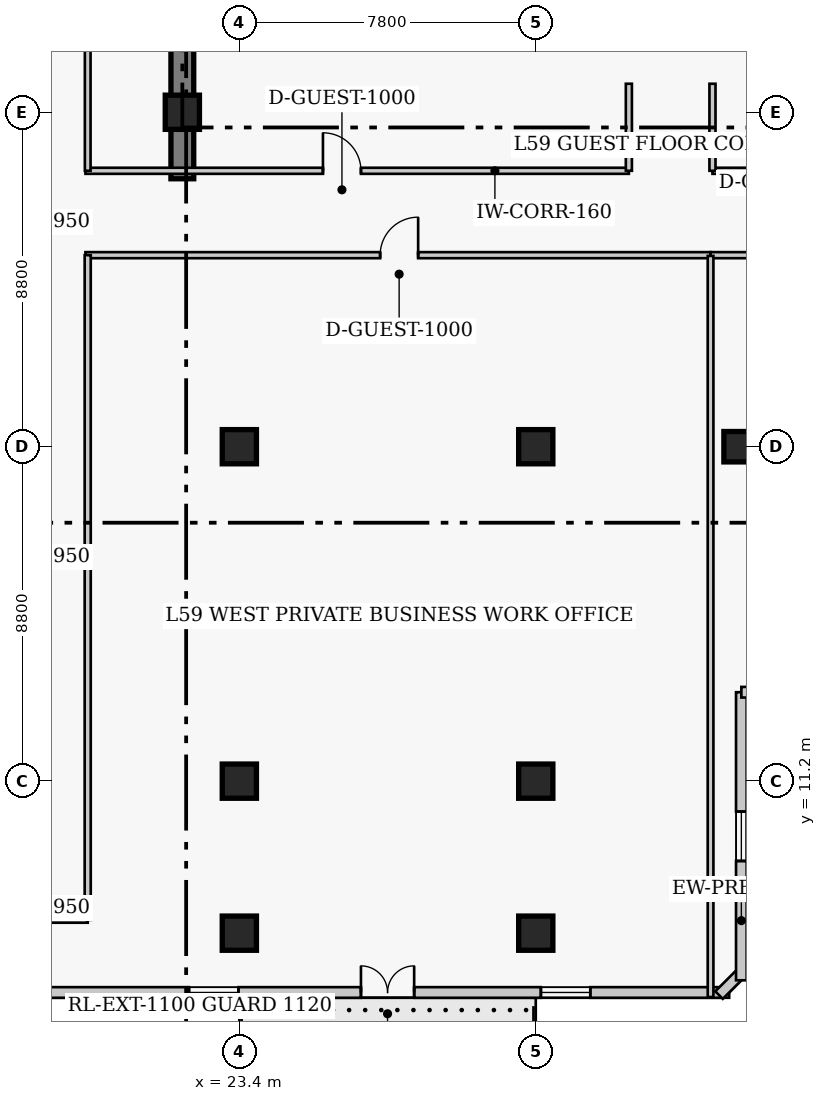
"""IFC4 building model, lengths in metres.
Left out: names, types, materials, properties, quantities, classifications, styles, units other than length and angle.
Written with IfcOpenShell. Run it as: python <this file> out.ifc"""

import sys

from ifc_helpers import new_model, si_unit, direction, frame, frame_2d, origin, origin_2d, place, context, subcontext, project, spatial, rectangle, extrude, element, fill, save


model = new_model("IFC4")
c1 = context("Model", 3, precision=1e-05, world=origin(), true_north=direction((0.0, 1.0)))
c2 = subcontext(c1, "Body", "Model", "MODEL_VIEW")
j1 = project(units=[si_unit("LENGTHUNIT", "METRE"), si_unit("PLANEANGLEUNIT", "RADIAN")], contexts=[c1])
p1 = place(None, origin())
s1 = spatial("IfcSite", under=j1, at=p1, CompositionType="ELEMENT")
p2 = place(p1, origin())
s2 = spatial("IfcBuilding", under=s1, at=p2, CompositionType="ELEMENT")
p3 = place(p2, frame((0.0, 0.0, 236.5)))
s3 = spatial("IfcBuildingStorey", under=s2, at=p3, CompositionType="ELEMENT", Elevation=236.5)
p4 = place(p3, frame((21.9, 27.05, 0.0), z_axis=(0.0, 0.0, 1.0), x_axis=(0.0, 1.0, 0.0)))
e1 = element("IfcWall", 1, at=p4, inside=s3, PredefinedType="SHEAR", context=c2, shape_type="SweptSolid", body=[
    extrude(rectangle(XDim=13.57, YDim=0.6, at=frame_2d((6.785, 0.0))), origin(), (0.0, 0.0, 1.0), 3.9),
])
for number, where, z_axis, x_axis in (
    (2, (23.4, 11.2, 0.0), (0.0, 0.0, 1.0), (1.0, 0.0, 0.0)),
    (3, (23.4, 20.0, 0.0), (0.0, 0.0, 1.0), (1.0, 0.0, 0.0)),
    (4, (31.2, 11.2, 0.0), (0.0, 0.0, 1.0), (1.0, 0.0, 0.0)),
    (5, (31.2, 20.0, 0.0), (0.0, 0.0, 1.0), (1.0, 0.0, 0.0)),
):
    element("IfcColumn", number, at=place(p3, frame(where, z_axis=z_axis, x_axis=x_axis)), inside=s3, PredefinedType="COLUMN", context=c2, shape_type="SweptSolid", body=[
        extrude(rectangle(XDim=0.9, YDim=0.9, at=origin_2d()), origin(), (0.0, 0.0, 1.0), 3.9),
    ])
p5 = place(p3, frame((36.75, 20.0, 0.0), z_axis=(0.0, 0.0, 1.0), x_axis=(1.0, 0.0, 0.0)))
e6 = element("IfcColumn", 6, at=p5, inside=s3, PredefinedType="COLUMN", context=c2, shape_type="SweptSolid", body=[
    extrude(rectangle(XDim=1.2, YDim=0.8, at=origin_2d()), origin(), (0.0, 0.0, 1.0), 3.9),
])
for number, where, z_axis, x_axis in (
    (7, (21.9, 28.8, 0.0), (0.0, 0.0, 1.0), (1.0, 0.0, 0.0)),
    (8, (23.4, 7.2, 0.0), (0.0, 0.0, 1.0), (1.0, 0.0, 0.0)),
    (9, (31.2, 7.2, 0.0), (0.0, 0.0, 1.0), (1.0, 0.0, 0.0)),
):
    element("IfcColumn", number, at=place(p3, frame(where, z_axis=z_axis, x_axis=x_axis)), inside=s3, PredefinedType="COLUMN", context=c2, shape_type="SweptSolid", body=[
        extrude(rectangle(XDim=0.9, YDim=0.9, at=origin_2d()), origin(), (0.0, 0.0, 1.0), 3.9),
    ])
p6 = place(p3, frame((10.46, 5.64, 0.0), z_axis=(0.0, 0.0, 1.0), x_axis=(1.0, 0.0, 0.0)))
e10 = element("IfcWall", 10, at=p6, inside=s3, PredefinedType="SOLIDWALL", context=c2, shape_type="SweptSolid", body=[
    extrude(rectangle(XDim=25.83, YDim=0.28, at=frame_2d((12.915, 0.0))), origin(), (0.0, 0.0, 1.0), 3.52),
])
p7 = place(p6, frame((16.14, 0.0, 0.0)))
e11 = element("IfcOpeningElement", 11, at=p7, cuts=e10, PredefinedType="OPENING", context=c2, shape_type="SweptSolid", body=[
    extrude(rectangle(XDim=1.4, YDim=2.15, at=frame_2d((0.7, 1.075))), frame((0.0, 0.15, 0.0), z_axis=(0.0, -1.0, 0.0), x_axis=(1.0, 0.0, 0.0)), (0.0, 0.0, 1.0), 0.3),
])
p8 = place(p6, frame((4.305, 0.0, 0.85)))
e12 = element("IfcOpeningElement", 12, at=p8, cuts=e10, PredefinedType="OPENING", context=c2, shape_type="SweptSolid", body=[
    extrude(rectangle(XDim=1.3, YDim=1.7, at=frame_2d((0.65, 0.85))), frame((0.0, 0.15, 0.0), z_axis=(0.0, -1.0, 0.0), x_axis=(1.0, 0.0, 0.0)), (0.0, 0.0, 1.0), 0.3),
])
p9 = place(p6, frame((11.615, 0.0, 0.85)))
e13 = element("IfcOpeningElement", 13, at=p9, cuts=e10, PredefinedType="OPENING", context=c2, shape_type="SweptSolid", body=[
    extrude(rectangle(XDim=1.3, YDim=1.7, at=frame_2d((0.65, 0.85))), frame((0.0, 0.15, 0.0), z_axis=(0.0, -1.0, 0.0), x_axis=(1.0, 0.0, 0.0)), (0.0, 0.0, 1.0), 0.3),
])
p10 = place(p6, frame((20.875, 0.0, 0.85)))
e14 = element("IfcOpeningElement", 14, at=p10, cuts=e10, PredefinedType="OPENING", context=c2, shape_type="SweptSolid", body=[
    extrude(rectangle(XDim=1.3, YDim=1.7, at=frame_2d((0.65, 0.85))), frame((0.0, 0.15, 0.0), z_axis=(0.0, -1.0, 0.0), x_axis=(1.0, 0.0, 0.0)), (0.0, 0.0, 1.0), 0.3),
])
p11 = place(p3, frame((36.023, 5.571, 0.0), z_axis=(0.0, 0.0, 1.0), x_axis=(0.707106781187, 0.707106781187, 0.0)))
e15 = element("IfcWall", 15, at=p11, inside=s3, PredefinedType="SOLIDWALL", context=c2, shape_type="SweptSolid", body=[
    extrude(rectangle(XDim=0.928, YDim=0.28, at=frame_2d((0.464, 0.0))), origin(), (0.0, 0.0, 1.0), 3.52),
])
p12 = place(p3, frame((36.61, 5.96, 0.0), z_axis=(0.0, 0.0, 1.0), x_axis=(0.0, 1.0, 0.0)))
e16 = element("IfcWall", 16, at=p12, inside=s3, PredefinedType="SOLIDWALL", context=c2, shape_type="SweptSolid", body=[
    extrude(rectangle(XDim=7.58, YDim=0.28, at=frame_2d((3.79, 0.0))), origin(), (0.0, 0.0, 1.0), 3.52),
])
p13 = place(p12, frame((3.14, 0.0, 0.85)))
e17 = element("IfcOpeningElement", 17, at=p13, cuts=e16, PredefinedType="OPENING", context=c2, shape_type="SweptSolid", body=[
    extrude(rectangle(XDim=1.3, YDim=1.7, at=frame_2d((0.65, 0.85))), frame((0.0, 0.15, 0.0), z_axis=(0.0, -1.0, 0.0), x_axis=(1.0, 0.0, 0.0)), (0.0, 0.0, 1.0), 0.3),
])
p14 = place(p3, frame((36.61, 13.54, 0.0), z_axis=(0.0, 0.0, 1.0), x_axis=(1.0, 0.0, 0.0)))
e18 = element("IfcWall", 18, at=p14, inside=s3, PredefinedType="SOLIDWALL", context=c2, shape_type="SweptSolid", body=[
    extrude(rectangle(XDim=4.78, YDim=0.28, at=frame_2d((2.39, 0.0))), origin(), (0.0, 0.0, 1.0), 3.52),
])
p15 = place(p14, frame((1.74, 0.0, 0.85)))
e19 = element("IfcOpeningElement", 19, at=p15, cuts=e18, PredefinedType="OPENING", context=c2, shape_type="SweptSolid", body=[
    extrude(rectangle(XDim=1.3, YDim=1.7, at=frame_2d((0.65, 0.85))), frame((0.0, 0.15, 0.0), z_axis=(0.0, -1.0, 0.0), x_axis=(1.0, 0.0, 0.0)), (0.0, 0.0, 1.0), 0.3),
])
p16 = place(p3, frame((19.35, 27.26, 0.0), z_axis=(0.0, 0.0, 1.0), x_axis=(1.0, 0.0, 0.0)))
e20 = element("IfcWall", 20, at=p16, inside=s3, PredefinedType="PARTITIONING", context=c2, shape_type="SweptSolid", body=[
    extrude(rectangle(XDim=14.3, YDim=0.16, at=frame_2d((7.15, 0.0))), origin(), (0.0, 0.0, 1.0), 3.52),
])
p17 = place(p16, frame((6.25, 0.0, 0.0)))
e21 = element("IfcOpeningElement", 21, at=p17, cuts=e20, PredefinedType="OPENING", context=c2, shape_type="SweptSolid", body=[
    extrude(rectangle(XDim=1.0, YDim=2.15, at=frame_2d((0.5, 1.075))), frame((0.0, 0.09, 0.0), z_axis=(0.0, -1.0, 0.0), x_axis=(1.0, 0.0, 0.0)), (0.0, 0.0, 1.0), 0.18),
])
p18 = place(p3, frame((35.85, 27.26, 0.0), z_axis=(0.0, 0.0, 1.0), x_axis=(1.0, 0.0, 0.0)))
e22 = element("IfcWall", 22, at=p18, inside=s3, PredefinedType="PARTITIONING", context=c2, shape_type="SweptSolid", body=[
    extrude(rectangle(XDim=5.73, YDim=0.16, at=frame_2d((2.865, 0.0))), origin(), (0.0, 0.0, 1.0), 3.52),
])
for number, where, z_axis, x_axis in (
    (23, (33.65, 27.26, 0.0), (0.0, 0.0, 1.0), (0.0, 1.0, 0.0)),
    (24, (35.85, 27.26, 0.0), (0.0, 0.0, 1.0), (0.0, 1.0, 0.0)),
):
    element("IfcWall", number, at=place(p3, frame(where, z_axis=z_axis, x_axis=x_axis)), inside=s3, PredefinedType="PARTITIONING", context=c2, shape_type="SweptSolid", body=[
        extrude(rectangle(XDim=2.29, YDim=0.16, at=frame_2d((1.145, 0.0))), origin(), (0.0, 0.0, 1.0), 3.52),
    ])
p19 = place(p3, frame((19.35, 25.04, 0.0), z_axis=(0.0, 0.0, 1.0), x_axis=(1.0, 0.0, 0.0)))
e25 = element("IfcWall", 25, at=p19, inside=s3, PredefinedType="PARTITIONING", context=c2, shape_type="SweptSolid", body=[
    extrude(rectangle(XDim=16.45, YDim=0.16, at=frame_2d((8.225, 0.0))), origin(), (0.0, 0.0, 1.0), 3.52),
])
p20 = place(p19, frame((7.755, 0.0, 0.0)))
e26 = element("IfcOpeningElement", 26, at=p20, cuts=e25, PredefinedType="OPENING", context=c2, shape_type="SweptSolid", body=[
    extrude(rectangle(XDim=1.0, YDim=2.15, at=frame_2d((0.5, 1.075))), frame((0.0, 0.09, 0.0), z_axis=(0.0, -1.0, 0.0), x_axis=(1.0, 0.0, 0.0)), (0.0, 0.0, 1.0), 0.18),
])
p21 = place(p3, frame((35.8, 25.04, 0.0), z_axis=(0.0, 0.0, 1.0), x_axis=(1.0, 0.0, 0.0)))
e27 = element("IfcWall", 27, at=p21, inside=s3, PredefinedType="PARTITIONING", context=c2, shape_type="SweptSolid", body=[
    extrude(rectangle(XDim=25.36, YDim=0.16, at=frame_2d((12.68, 0.0))), origin(), (0.0, 0.0, 1.0), 3.52),
])
p22 = place(p21, frame((1.518, 0.0, 0.0)))
e28 = element("IfcOpeningElement", 28, at=p22, cuts=e27, PredefinedType="OPENING", context=c2, shape_type="SweptSolid", body=[
    extrude(rectangle(XDim=0.95, YDim=2.1, at=frame_2d((0.475, 1.05))), frame((0.0, 0.09, 0.0), z_axis=(0.0, -1.0, 0.0), x_axis=(1.0, 0.0, 0.0)), (0.0, 0.0, 1.0), 0.18),
])
p23 = place(p21, frame((9.278, 0.0, 0.0)))
e29 = element("IfcOpeningElement", 29, at=p23, cuts=e27, PredefinedType="OPENING", context=c2, shape_type="SweptSolid", body=[
    extrude(rectangle(XDim=1.0, YDim=2.15, at=frame_2d((0.5, 1.075))), frame((0.0, 0.09, 0.0), z_axis=(0.0, -1.0, 0.0), x_axis=(1.0, 0.0, 0.0)), (0.0, 0.0, 1.0), 0.18),
])
p24 = place(p21, frame((16.06, 0.0, 0.0)))
e30 = element("IfcOpeningElement", 30, at=p24, cuts=e27, PredefinedType="OPENING", context=c2, shape_type="SweptSolid", body=[
    extrude(rectangle(XDim=0.95, YDim=2.1, at=frame_2d((0.475, 1.05))), frame((0.0, 0.09, 0.0), z_axis=(0.0, -1.0, 0.0), x_axis=(1.0, 0.0, 0.0)), (0.0, 0.0, 1.0), 0.18),
])
p25 = place(p21, frame((18.985, 0.0, 0.0)))
e31 = element("IfcOpeningElement", 31, at=p25, cuts=e27, PredefinedType="OPENING", context=c2, shape_type="SweptSolid", body=[
    extrude(rectangle(XDim=0.95, YDim=2.1, at=frame_2d((0.475, 1.05))), frame((0.0, 0.09, 0.0), z_axis=(0.0, -1.0, 0.0), x_axis=(1.0, 0.0, 0.0)), (0.0, 0.0, 1.0), 0.18),
])
p26 = place(p21, frame((23.815, 0.0, 0.0)))
e32 = element("IfcOpeningElement", 32, at=p26, cuts=e27, PredefinedType="OPENING", context=c2, shape_type="SweptSolid", body=[
    extrude(rectangle(XDim=0.95, YDim=2.1, at=frame_2d((0.475, 1.05))), frame((0.0, 0.09, 0.0), z_axis=(0.0, -1.0, 0.0), x_axis=(1.0, 0.0, 0.0)), (0.0, 0.0, 1.0), 0.18),
])
p27 = place(p3, frame((19.41, 7.55, 0.0), z_axis=(0.0, 0.0, 1.0), x_axis=(0.0, 1.0, 0.0)))
e33 = element("IfcWall", 33, at=p27, inside=s3, PredefinedType="PARTITIONING", context=c2, shape_type="SweptSolid", body=[
    extrude(rectangle(XDim=17.49, YDim=0.16, at=frame_2d((8.745, 0.0))), origin(), (0.0, 0.0, 1.0), 3.116),
])
p28 = place(p3, frame((17.19, 7.55, 0.0), z_axis=(0.0, 0.0, 1.0), x_axis=(1.0, 0.0, 0.0)))
e34 = element("IfcWall", 34, at=p28, inside=s3, PredefinedType="PARTITIONING", context=c2, shape_type="SweptSolid", body=[
    extrude(rectangle(XDim=2.22, YDim=0.15, at=frame_2d((1.11, 0.0))), origin(), (0.0, 0.0, 1.0), 3.52),
])
p29 = place(p3, frame((19.41, 27.26, 0.0), z_axis=(0.0, 0.0, 1.0), x_axis=(0.0, 1.0, 0.0)))
e35 = element("IfcWall", 35, at=p29, inside=s3, PredefinedType="PARTITIONING", context=c2, shape_type="SweptSolid", body=[
    extrude(rectangle(XDim=5.54, YDim=0.15, at=frame_2d((2.77, 0.0))), origin(), (0.0, 0.0, 1.0), 3.52),
])
p30 = place(p3, frame((35.8, 5.52, 0.0), z_axis=(0.0, 0.0, 1.0), x_axis=(0.0, 1.0, 0.0)))
e36 = element("IfcWall", 36, at=p30, inside=s3, PredefinedType="PARTITIONING", context=c2, shape_type="SweptSolid", body=[
    extrude(rectangle(XDim=19.5, YDim=0.15, at=frame_2d((9.75, 0.0))), origin(), (0.0, 0.0, 1.0), 3.52),
])
p31 = place(p7, origin())
e37 = element("IfcDoor", 37, at=p31, inside=s3, OperationType="DOUBLE_DOOR_SINGLE_SWING", PredefinedType="DOOR", context=c2, shape_type="SweptSolid", body=[
    extrude(rectangle(XDim=1.4, YDim=2.15, at=frame_2d((0.7, 1.075))), frame((0.0, 0.025, 0.0), z_axis=(0.0, -1.0, 0.0), x_axis=(1.0, 0.0, 0.0)), (0.0, 0.0, 1.0), 0.05),
])
fill(e11, e37)
p32 = place(p9, origin())
e38 = element("IfcWindow", 38, at=p32, inside=s3, PartitioningType="SINGLE_PANEL", PredefinedType="WINDOW", context=c2, shape_type="SweptSolid", body=[
    extrude(rectangle(XDim=1.3, YDim=1.7, at=frame_2d((0.65, 0.85))), frame((0.0, 0.03, 0.0), z_axis=(0.0, -1.0, 0.0), x_axis=(1.0, 0.0, 0.0)), (0.0, 0.0, 1.0), 0.06),
])
fill(e13, e38)
p33 = place(p10, origin())
e39 = element("IfcWindow", 39, at=p33, inside=s3, PartitioningType="SINGLE_PANEL", PredefinedType="WINDOW", context=c2, shape_type="SweptSolid", body=[
    extrude(rectangle(XDim=1.3, YDim=1.7, at=frame_2d((0.65, 0.85))), frame((0.0, 0.03, 0.0), z_axis=(0.0, -1.0, 0.0), x_axis=(1.0, 0.0, 0.0)), (0.0, 0.0, 1.0), 0.06),
])
fill(e14, e39)
p34 = place(p13, origin())
e40 = element("IfcWindow", 40, at=p34, inside=s3, PartitioningType="SINGLE_PANEL", PredefinedType="WINDOW", context=c2, shape_type="SweptSolid", body=[
    extrude(rectangle(XDim=1.3, YDim=1.7, at=frame_2d((0.65, 0.85))), frame((0.0, 0.03, 0.0), z_axis=(0.0, -1.0, 0.0), x_axis=(1.0, 0.0, 0.0)), (0.0, 0.0, 1.0), 0.06),
])
fill(e17, e40)
p35 = place(p17, origin())
e41 = element("IfcDoor", 41, at=p35, inside=s3, OperationType="SINGLE_SWING_LEFT", PredefinedType="DOOR", context=c2, shape_type="SweptSolid", body=[
    extrude(rectangle(XDim=1.0, YDim=2.15, at=frame_2d((0.5, 1.075))), frame((0.0, 0.025, 0.0), z_axis=(0.0, -1.0, 0.0), x_axis=(1.0, 0.0, 0.0)), (0.0, 0.0, 1.0), 0.05),
])
fill(e21, e41)
p36 = place(p20, origin())
e42 = element("IfcDoor", 42, at=p36, inside=s3, OperationType="SINGLE_SWING_RIGHT", PredefinedType="DOOR", context=c2, shape_type="SweptSolid", body=[
    extrude(rectangle(XDim=1.0, YDim=2.15, at=frame_2d((0.5, 1.075))), frame((0.0, 0.025, 0.0), z_axis=(0.0, -1.0, 0.0), x_axis=(1.0, 0.0, 0.0)), (0.0, 0.0, 1.0), 0.05),
])
fill(e26, e42)
save(model, sys.argv[1])
